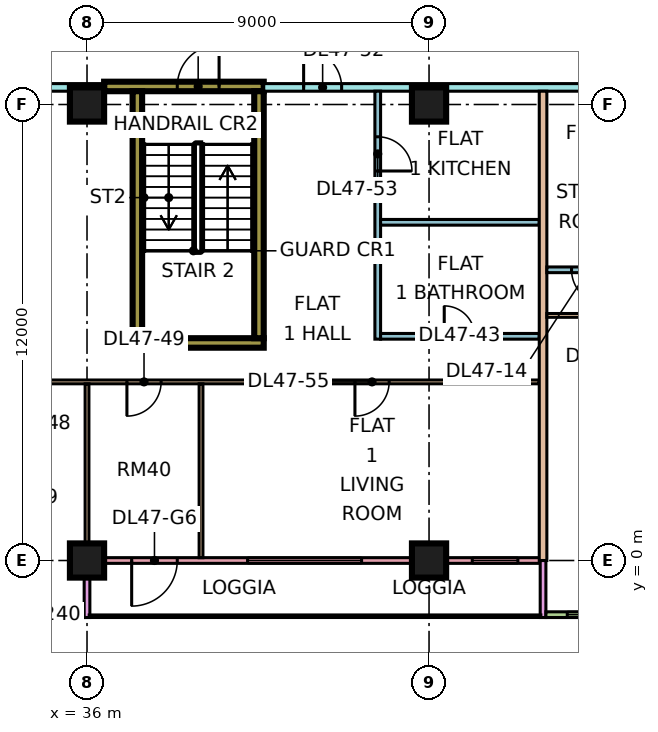
"""IFC4 building model, lengths in metres.
Left out: names, types, materials, properties, quantities, classifications, styles, units other than length and angle.
Written with IfcOpenShell. Run it as: python <this file> out.ifc"""

import sys

from ifc_helpers import new_model, si_unit, direction, frame, frame_2d, origin, origin_2d, place, context, subcontext, project, spatial, rectangle, extrude, element, fill, save


model = new_model("IFC4")
c1 = context("Model", 3, precision=1e-05, world=origin(), true_north=direction((0.0, 1.0)))
c2 = subcontext(c1, "Body", "Model", "MODEL_VIEW")
j1 = project(units=[si_unit("LENGTHUNIT", "METRE"), si_unit("PLANEANGLEUNIT", "RADIAN")], contexts=[c1])
p1 = place(None, origin())
s1 = spatial("IfcSite", under=j1, at=p1, CompositionType="ELEMENT")
p2 = place(p1, origin())
s2 = spatial("IfcBuilding", under=s1, at=p2, CompositionType="ELEMENT")
p3 = place(p2, frame((0.0, 0.0, 202.4)))
s3 = spatial("IfcBuildingStorey", under=s2, at=p3, CompositionType="ELEMENT", Elevation=202.4)
for number, where, z_axis, x_axis in (
    (1, (36.0, 0.0, 0.0), (0.0, 0.0, 1.0), (1.0, 0.0, 0.0)),
    (2, (36.0, 12.0, 0.0), (0.0, 0.0, 1.0), (1.0, 0.0, 0.0)),
    (3, (45.0, 0.0, 0.0), (0.0, 0.0, 1.0), (1.0, 0.0, 0.0)),
    (4, (45.0, 12.0, 0.0), (0.0, 0.0, 1.0), (1.0, 0.0, 0.0)),
):
    element("IfcColumn", number, at=place(p3, frame(where, z_axis=z_axis, x_axis=x_axis)), inside=s3, PredefinedType="COLUMN", context=c2, shape_type="SweptSolid", body=[
        extrude(rectangle(XDim=0.9, YDim=0.9, at=origin_2d()), origin(), (0.0, 0.0, 1.0), 3.75),
    ])
p4 = place(p3, frame((37.2, 5.725, 0.0), z_axis=(0.0, 0.0, 1.0), x_axis=(1.0, 0.0, 0.0)))
e5 = element("IfcWall", 5, at=p4, inside=s3, PredefinedType="SHEAR", context=c2, shape_type="SweptSolid", body=[
    extrude(rectangle(XDim=3.45, YDim=0.25, at=frame_2d((1.725, 0.0))), origin(), (0.0, 0.0, 1.0), 3.75),
])
p5 = place(p3, frame((36.45, 12.475, 0.0), z_axis=(0.0, 0.0, 1.0), x_axis=(1.0, 0.0, 0.0)))
e6 = element("IfcWall", 6, at=p5, inside=s3, PredefinedType="SHEAR", context=c2, shape_type="SweptSolid", body=[
    extrude(rectangle(XDim=4.2, YDim=0.25, at=frame_2d((2.1, 0.0))), origin(), (0.0, 0.0, 1.0), 3.75),
])
p6 = place(p5, frame((1.925, 0.0, 0.0)))
e7 = element("IfcOpeningElement", 7, at=p6, cuts=e6, PredefinedType="OPENING", context=c2, shape_type="SweptSolid", body=[
    extrude(rectangle(XDim=1.1, YDim=2.2, at=frame_2d((0.55, 1.1))), frame((0.0, 0.135, 0.0), z_axis=(0.0, -1.0, 0.0), x_axis=(1.0, 0.0, 0.0)), (0.0, 0.0, 1.0), 0.27),
])
for number, where, z_axis, x_axis in (
    (8, (37.325, 5.85, 0.0), (0.0, 0.0, 1.0), (0.0, 1.0, 0.0)),
    (9, (40.525, 5.85, 0.0), (0.0, 0.0, 1.0), (0.0, 1.0, 0.0)),
):
    element("IfcWall", number, at=place(p3, frame(where, z_axis=z_axis, x_axis=x_axis)), inside=s3, PredefinedType="SHEAR", context=c2, shape_type="SweptSolid", body=[
        extrude(rectangle(XDim=6.5, YDim=0.25, at=frame_2d((3.25, 0.0))), origin(), (0.0, 0.0, 1.0), 3.75),
    ])
p7 = place(p3, frame((24.075, -1.425, 0.0), z_axis=(0.0, 0.0, 1.0), x_axis=(1.0, 0.0, 0.0)))
e10 = element("IfcWall", 10, at=p7, inside=s3, PredefinedType="SOLIDWALL", context=c2, shape_type="SweptSolid", body=[
    extrude(rectangle(XDim=11.85, YDim=0.15, at=frame_2d((5.925, 0.0))), origin(), (0.0, 0.0, 1.0), 3.3),
])
p8 = place(p7, frame((0.562, 0.0, 0.45)))
e11 = element("IfcOpeningElement", 11, at=p8, cuts=e10, PredefinedType="OPENING", context=c2, shape_type="SweptSolid", body=[
    extrude(rectangle(XDim=1.8, YDim=2.4, at=frame_2d((0.9, 1.2))), frame((0.0, 0.085, 0.0), z_axis=(0.0, -1.0, 0.0), x_axis=(1.0, 0.0, 0.0)), (0.0, 0.0, 1.0), 0.17),
])
p9 = place(p7, frame((3.525, 0.0, 0.45)))
e12 = element("IfcOpeningElement", 12, at=p9, cuts=e10, PredefinedType="OPENING", context=c2, shape_type="SweptSolid", body=[
    extrude(rectangle(XDim=1.8, YDim=2.4, at=frame_2d((0.9, 1.2))), frame((0.0, 0.085, 0.0), z_axis=(0.0, -1.0, 0.0), x_axis=(1.0, 0.0, 0.0)), (0.0, 0.0, 1.0), 0.17),
])
p10 = place(p7, frame((6.525, 0.0, 0.45)))
e13 = element("IfcOpeningElement", 13, at=p10, cuts=e10, PredefinedType="OPENING", context=c2, shape_type="SweptSolid", body=[
    extrude(rectangle(XDim=1.8, YDim=2.4, at=frame_2d((0.9, 1.2))), frame((0.0, 0.085, 0.0), z_axis=(0.0, -1.0, 0.0), x_axis=(1.0, 0.0, 0.0)), (0.0, 0.0, 1.0), 0.17),
])
p11 = place(p7, frame((9.488, 0.0, 0.45)))
e14 = element("IfcOpeningElement", 14, at=p11, cuts=e10, PredefinedType="OPENING", context=c2, shape_type="SweptSolid", body=[
    extrude(rectangle(XDim=1.8, YDim=2.4, at=frame_2d((0.9, 1.2))), frame((0.0, 0.085, 0.0), z_axis=(0.0, -1.0, 0.0), x_axis=(1.0, 0.0, 0.0)), (0.0, 0.0, 1.0), 0.17),
])
p12 = place(p3, frame((36.075, 0.0, 0.0), z_axis=(0.0, 0.0, 1.0), x_axis=(1.0, 0.0, 0.0)))
e15 = element("IfcWall", 15, at=p12, inside=s3, PredefinedType="SOLIDWALL", context=c2, shape_type="SweptSolid", body=[
    extrude(rectangle(XDim=11.85, YDim=0.15, at=frame_2d((5.925, 0.0))), origin(), (0.0, 0.0, 1.0), 3.3),
])
p13 = place(p12, frame((1.1, 0.0, 0.0)))
e16 = element("IfcOpeningElement", 16, at=p13, cuts=e15, PredefinedType="OPENING", context=c2, shape_type="SweptSolid", body=[
    extrude(rectangle(XDim=1.2, YDim=2.4, at=frame_2d((0.6, 1.2))), frame((0.0, 0.085, 0.0), z_axis=(0.0, -1.0, 0.0), x_axis=(1.0, 0.0, 0.0)), (0.0, 0.0, 1.0), 0.17),
])
p14 = place(p12, frame((4.15, 0.0, 0.45)))
e17 = element("IfcOpeningElement", 17, at=p14, cuts=e15, PredefinedType="OPENING", context=c2, shape_type="SweptSolid", body=[
    extrude(rectangle(XDim=3.0, YDim=2.4, at=frame_2d((1.5, 1.2))), frame((0.0, 0.085, 0.0), z_axis=(0.0, -1.0, 0.0), x_axis=(1.0, 0.0, 0.0)), (0.0, 0.0, 1.0), 0.17),
])
p15 = place(p12, frame((10.062, 0.0, 0.45)))
e18 = element("IfcOpeningElement", 18, at=p15, cuts=e15, PredefinedType="OPENING", context=c2, shape_type="SweptSolid", body=[
    extrude(rectangle(XDim=1.2, YDim=2.4, at=frame_2d((0.6, 1.2))), frame((0.0, 0.085, 0.0), z_axis=(0.0, -1.0, 0.0), x_axis=(1.0, 0.0, 0.0)), (0.0, 0.0, 1.0), 0.17),
])
for number, where, z_axis, x_axis in (
    (19, (36.0, -1.5, 0.0), (0.0, 0.0, 1.0), (0.0, 1.0, 0.0)),
    (20, (48.0, -1.5, 0.0), (0.0, 0.0, 1.0), (0.0, 1.0, 0.0)),
):
    element("IfcWall", number, at=place(p3, frame(where, z_axis=z_axis, x_axis=x_axis)), inside=s3, PredefinedType="SOLIDWALL", context=c2, shape_type="SweptSolid", body=[
        extrude(rectangle(XDim=1.5, YDim=0.15, at=frame_2d((0.75, 0.0))), origin(), (0.0, 0.0, 1.0), 3.3),
    ])
p16 = place(p3, frame((48.075, -1.425, 0.0), z_axis=(0.0, 0.0, 1.0), x_axis=(1.0, 0.0, 0.0)))
e21 = element("IfcWall", 21, at=p16, inside=s3, PredefinedType="SOLIDWALL", context=c2, shape_type="SweptSolid", body=[
    extrude(rectangle(XDim=13.425, YDim=0.15, at=frame_2d((6.712, 0.0))), origin(), (0.0, 0.0, 1.0), 3.3),
])
p17 = place(p16, frame((0.562, 0.0, 0.45)))
e22 = element("IfcOpeningElement", 22, at=p17, cuts=e21, PredefinedType="OPENING", context=c2, shape_type="SweptSolid", body=[
    extrude(rectangle(XDim=1.8, YDim=2.4, at=frame_2d((0.9, 1.2))), frame((0.0, 0.085, 0.0), z_axis=(0.0, -1.0, 0.0), x_axis=(1.0, 0.0, 0.0)), (0.0, 0.0, 1.0), 0.17),
])
p18 = place(p16, frame((3.525, 0.0, 0.45)))
e23 = element("IfcOpeningElement", 23, at=p18, cuts=e21, PredefinedType="OPENING", context=c2, shape_type="SweptSolid", body=[
    extrude(rectangle(XDim=1.8, YDim=2.4, at=frame_2d((0.9, 1.2))), frame((0.0, 0.085, 0.0), z_axis=(0.0, -1.0, 0.0), x_axis=(1.0, 0.0, 0.0)), (0.0, 0.0, 1.0), 0.17),
])
p19 = place(p16, frame((6.525, 0.0, 0.45)))
e24 = element("IfcOpeningElement", 24, at=p19, cuts=e21, PredefinedType="OPENING", context=c2, shape_type="SweptSolid", body=[
    extrude(rectangle(XDim=1.8, YDim=2.4, at=frame_2d((0.9, 1.2))), frame((0.0, 0.085, 0.0), z_axis=(0.0, -1.0, 0.0), x_axis=(1.0, 0.0, 0.0)), (0.0, 0.0, 1.0), 0.17),
])
p20 = place(p16, frame((9.675, 0.0, 0.45)))
e25 = element("IfcOpeningElement", 25, at=p20, cuts=e21, PredefinedType="OPENING", context=c2, shape_type="SweptSolid", body=[
    extrude(rectangle(XDim=3.0, YDim=2.4, at=frame_2d((1.5, 1.2))), frame((0.0, 0.085, 0.0), z_axis=(0.0, -1.0, 0.0), x_axis=(1.0, 0.0, 0.0)), (0.0, 0.0, 1.0), 0.17),
])
p21 = place(p3, frame((33.05, 4.7, 0.0), z_axis=(0.0, 0.0, 1.0), x_axis=(1.0, 0.0, 0.0)))
e26 = element("IfcWall", 26, at=p21, inside=s3, PredefinedType="PARTITIONING", context=c2, shape_type="SweptSolid", body=[
    extrude(rectangle(XDim=14.85, YDim=0.1, at=frame_2d((7.425, 0.0))), origin(), (0.0, 0.0, 1.0), 3.3),
])
p22 = place(p21, frame((1.0, 0.0, 0.0)))
e27 = element("IfcOpeningElement", 27, at=p22, cuts=e26, PredefinedType="OPENING", context=c2, shape_type="SweptSolid", body=[
    extrude(rectangle(XDim=0.9, YDim=2.1, at=frame_2d((0.45, 1.05))), frame((0.0, 0.06, 0.0), z_axis=(0.0, -1.0, 0.0), x_axis=(1.0, 0.0, 0.0)), (0.0, 0.0, 1.0), 0.12),
])
p23 = place(p21, frame((4.0, 0.0, 0.0)))
e28 = element("IfcOpeningElement", 28, at=p23, cuts=e26, PredefinedType="OPENING", context=c2, shape_type="SweptSolid", body=[
    extrude(rectangle(XDim=0.9, YDim=2.1, at=frame_2d((0.45, 1.05))), frame((0.0, 0.06, 0.0), z_axis=(0.0, -1.0, 0.0), x_axis=(1.0, 0.0, 0.0)), (0.0, 0.0, 1.0), 0.12),
])
p24 = place(p21, frame((10.0, 0.0, 0.0)))
e29 = element("IfcOpeningElement", 29, at=p24, cuts=e26, PredefinedType="OPENING", context=c2, shape_type="SweptSolid", body=[
    extrude(rectangle(XDim=0.9, YDim=2.1, at=frame_2d((0.45, 1.05))), frame((0.0, 0.06, 0.0), z_axis=(0.0, -1.0, 0.0), x_axis=(1.0, 0.0, 0.0)), (0.0, 0.0, 1.0), 0.12),
])
p25 = place(p3, frame((34.0, 12.45, 0.0), z_axis=(0.0, 0.0, 1.0), x_axis=(1.0, 0.0, 0.0)))
e30 = element("IfcWall", 30, at=p25, inside=s3, PredefinedType="PARTITIONING", context=c2, shape_type="SweptSolid", body=[
    extrude(rectangle(XDim=2.451, YDim=0.2, at=frame_2d((1.226, 0.0))), origin(), (0.0, 0.0, 1.0), 3.3),
])
p26 = place(p3, frame((36.0, 0.0, 0.0), z_axis=(0.0, 0.0, 1.0), x_axis=(0.0, 1.0, 0.0)))
e31 = element("IfcWall", 31, at=p26, inside=s3, PredefinedType="PARTITIONING", context=c2, shape_type="SweptSolid", body=[
    extrude(rectangle(XDim=4.65, YDim=0.1, at=frame_2d((2.325, 0.0))), origin(), (0.0, 0.0, 1.0), 3.3),
])
p27 = place(p3, frame((39.0, 0.074, 0.0), z_axis=(0.0, 0.0, 1.0), x_axis=(0.0, 1.0, 0.0)))
e32 = element("IfcWall", 32, at=p27, inside=s3, PredefinedType="PARTITIONING", context=c2, shape_type="SweptSolid", body=[
    extrude(rectangle(XDim=4.576, YDim=0.1, at=frame_2d((2.288, 0.0))), origin(), (0.0, 0.0, 1.0), 3.3),
])
p28 = place(p3, frame((40.65, 12.45, 0.0), z_axis=(0.0, 0.0, 1.0), x_axis=(1.0, 0.0, 0.0)))
e33 = element("IfcWall", 33, at=p28, inside=s3, PredefinedType="PARTITIONING", context=c2, shape_type="SweptSolid", body=[
    extrude(rectangle(XDim=22.276, YDim=0.2, at=frame_2d((11.138, 0.0))), origin(), (0.0, 0.0, 1.0), 3.3),
])
p29 = place(p28, frame((20.55, 0.0, 0.0)))
e34 = element("IfcOpeningElement", 34, at=p29, cuts=e33, PredefinedType="OPENING", context=c2, shape_type="SweptSolid", body=[
    extrude(rectangle(XDim=1.0, YDim=2.1, at=frame_2d((0.5, 1.05))), frame((0.0, 0.11, 0.0), z_axis=(0.0, -1.0, 0.0), x_axis=(1.0, 0.0, 0.0)), (0.0, 0.0, 1.0), 0.22),
])
p30 = place(p28, frame((1.05, 0.0, 0.0)))
e35 = element("IfcOpeningElement", 35, at=p30, cuts=e33, PredefinedType="OPENING", context=c2, shape_type="SweptSolid", body=[
    extrude(rectangle(XDim=1.0, YDim=2.1, at=frame_2d((0.5, 1.05))), frame((0.0, 0.11, 0.0), z_axis=(0.0, -1.0, 0.0), x_axis=(1.0, 0.0, 0.0)), (0.0, 0.0, 1.0), 0.22),
])
p31 = place(p3, frame((43.65, 5.825, 0.0), z_axis=(0.0, 0.0, 1.0), x_axis=(0.0, 1.0, 0.0)))
e36 = element("IfcWall", 36, at=p31, inside=s3, PredefinedType="PARTITIONING", context=c2, shape_type="SweptSolid", body=[
    extrude(rectangle(XDim=6.525, YDim=0.15, at=frame_2d((3.263, 0.0))), origin(), (0.0, 0.0, 1.0), 3.3),
])
p32 = place(p31, frame((4.425, 0.0, 0.0)))
e37 = element("IfcOpeningElement", 37, at=p32, cuts=e36, PredefinedType="OPENING", context=c2, shape_type="SweptSolid", body=[
    extrude(rectangle(XDim=0.9, YDim=2.1, at=frame_2d((0.45, 1.05))), frame((0.0, 0.085, 0.0), z_axis=(0.0, -1.0, 0.0), x_axis=(1.0, 0.0, 0.0)), (0.0, 0.0, 1.0), 0.17),
])
p33 = place(p3, frame((43.725, 5.9, 0.0), z_axis=(0.0, 0.0, 1.0), x_axis=(1.0, 0.0, 0.0)))
e38 = element("IfcWall", 38, at=p33, inside=s3, PredefinedType="PARTITIONING", context=c2, shape_type="SweptSolid", body=[
    extrude(rectangle(XDim=4.175, YDim=0.15, at=frame_2d((2.087, 0.0))), origin(), (0.0, 0.0, 1.0), 3.3),
])
p34 = place(p33, frame((1.675, 0.0, 0.0)))
e39 = element("IfcOpeningElement", 39, at=p34, cuts=e38, PredefinedType="OPENING", context=c2, shape_type="SweptSolid", body=[
    extrude(rectangle(XDim=0.8, YDim=2.1, at=frame_2d((0.4, 1.05))), frame((0.0, 0.085, 0.0), z_axis=(0.0, -1.0, 0.0), x_axis=(1.0, 0.0, 0.0)), (0.0, 0.0, 1.0), 0.17),
])
p35 = place(p3, frame((43.725, 8.9, 0.0), z_axis=(0.0, 0.0, 1.0), x_axis=(1.0, 0.0, 0.0)))
e40 = element("IfcWall", 40, at=p35, inside=s3, PredefinedType="PARTITIONING", context=c2, shape_type="SweptSolid", body=[
    extrude(rectangle(XDim=4.175, YDim=0.15, at=frame_2d((2.087, 0.0))), origin(), (0.0, 0.0, 1.0), 3.3),
])
p36 = place(p3, frame((48.0, 0.0, 0.0), z_axis=(0.0, 0.0, 1.0), x_axis=(0.0, 1.0, 0.0)))
e41 = element("IfcWall", 41, at=p36, inside=s3, PredefinedType="PARTITIONING", context=c2, shape_type="SweptSolid", body=[
    extrude(rectangle(XDim=12.35, YDim=0.2, at=frame_2d((6.175, 0.0))), origin(), (0.0, 0.0, 1.0), 3.3),
])
p37 = place(p3, frame((48.1, 6.45, 0.0), z_axis=(0.0, 0.0, 1.0), x_axis=(1.0, 0.0, 0.0)))
e42 = element("IfcWall", 42, at=p37, inside=s3, PredefinedType="PARTITIONING", context=c2, shape_type="SweptSolid", body=[
    extrude(rectangle(XDim=8.95, YDim=0.1, at=frame_2d((4.475, 0.0))), origin(), (0.0, 0.0, 1.0), 3.3),
])
p38 = place(p37, frame((0.95, 0.0, 0.0)))
e43 = element("IfcOpeningElement", 43, at=p38, cuts=e42, PredefinedType="OPENING", context=c2, shape_type="SweptSolid", body=[
    extrude(rectangle(XDim=0.9, YDim=2.1, at=frame_2d((0.45, 1.05))), frame((0.0, 0.06, 0.0), z_axis=(0.0, -1.0, 0.0), x_axis=(1.0, 0.0, 0.0)), (0.0, 0.0, 1.0), 0.12),
])
p39 = place(p37, frame((3.95, 0.0, 0.0)))
e44 = element("IfcOpeningElement", 44, at=p39, cuts=e42, PredefinedType="OPENING", context=c2, shape_type="SweptSolid", body=[
    extrude(rectangle(XDim=0.9, YDim=2.1, at=frame_2d((0.45, 1.05))), frame((0.0, 0.06, 0.0), z_axis=(0.0, -1.0, 0.0), x_axis=(1.0, 0.0, 0.0)), (0.0, 0.0, 1.0), 0.12),
])
p40 = place(p37, frame((6.95, 0.0, 0.0)))
e45 = element("IfcOpeningElement", 45, at=p40, cuts=e42, PredefinedType="OPENING", context=c2, shape_type="SweptSolid", body=[
    extrude(rectangle(XDim=0.9, YDim=2.1, at=frame_2d((0.45, 1.05))), frame((0.0, 0.06, 0.0), z_axis=(0.0, -1.0, 0.0), x_axis=(1.0, 0.0, 0.0)), (0.0, 0.0, 1.0), 0.12),
])
p41 = place(p3, frame((48.1, 7.65, 0.0), z_axis=(0.0, 0.0, 1.0), x_axis=(1.0, 0.0, 0.0)))
e46 = element("IfcWall", 46, at=p41, inside=s3, PredefinedType="PARTITIONING", context=c2, shape_type="SweptSolid", body=[
    extrude(rectangle(XDim=12.25, YDim=0.15, at=frame_2d((6.125, 0.0))), origin(), (0.0, 0.0, 1.0), 3.3),
])
p42 = place(p41, frame((3.75, 0.0, 0.0)))
e47 = element("IfcOpeningElement", 47, at=p42, cuts=e46, PredefinedType="OPENING", context=c2, shape_type="SweptSolid", body=[
    extrude(rectangle(XDim=0.8, YDim=2.1, at=frame_2d((0.4, 1.05))), frame((0.0, 0.085, 0.0), z_axis=(0.0, -1.0, 0.0), x_axis=(1.0, 0.0, 0.0)), (0.0, 0.0, 1.0), 0.17),
])
p43 = place(p41, frame((0.65, 0.0, 0.0)))
e48 = element("IfcOpeningElement", 48, at=p43, cuts=e46, PredefinedType="OPENING", context=c2, shape_type="SweptSolid", body=[
    extrude(rectangle(XDim=0.9, YDim=2.1, at=frame_2d((0.45, 1.05))), frame((0.0, 0.085, 0.0), z_axis=(0.0, -1.0, 0.0), x_axis=(1.0, 0.0, 0.0)), (0.0, 0.0, 1.0), 0.17),
])
p44 = place(p11, origin())
e49 = element("IfcWindow", 49, at=p44, inside=s3, PartitioningType="SINGLE_PANEL", PredefinedType="WINDOW", context=c2, shape_type="SweptSolid", body=[
    extrude(rectangle(XDim=1.8, YDim=2.4, at=frame_2d((0.9, 1.2))), frame((0.0, 0.03, 0.0), z_axis=(0.0, -1.0, 0.0), x_axis=(1.0, 0.0, 0.0)), (0.0, 0.0, 1.0), 0.06),
])
fill(e14, e49)
p45 = place(p13, frame((1.2, 0.0, 0.0), z_axis=(0.0, 0.0, 1.0), x_axis=(-1.0, 0.0, 0.0)))
e50 = element("IfcDoor", 50, at=p45, inside=s3, OperationType="DOUBLE_DOOR_SINGLE_SWING", PredefinedType="DOOR", context=c2, shape_type="SweptSolid", body=[
    extrude(rectangle(XDim=1.2, YDim=2.4, at=frame_2d((0.6, 1.2))), frame((0.0, 0.025, 0.0), z_axis=(0.0, -1.0, 0.0), x_axis=(1.0, 0.0, 0.0)), (0.0, 0.0, 1.0), 0.05),
])
fill(e16, e50)
p46 = place(p14, origin())
e51 = element("IfcWindow", 51, at=p46, inside=s3, PartitioningType="SINGLE_PANEL", PredefinedType="WINDOW", context=c2, shape_type="SweptSolid", body=[
    extrude(rectangle(XDim=3.0, YDim=2.4, at=frame_2d((1.5, 1.2))), frame((0.0, 0.03, 0.0), z_axis=(0.0, -1.0, 0.0), x_axis=(1.0, 0.0, 0.0)), (0.0, 0.0, 1.0), 0.06),
])
fill(e17, e51)
p47 = place(p15, origin())
e52 = element("IfcWindow", 52, at=p47, inside=s3, PartitioningType="SINGLE_PANEL", PredefinedType="WINDOW", context=c2, shape_type="SweptSolid", body=[
    extrude(rectangle(XDim=1.2, YDim=2.4, at=frame_2d((0.6, 1.2))), frame((0.0, 0.03, 0.0), z_axis=(0.0, -1.0, 0.0), x_axis=(1.0, 0.0, 0.0)), (0.0, 0.0, 1.0), 0.06),
])
fill(e18, e52)
p48 = place(p17, origin())
e53 = element("IfcWindow", 53, at=p48, inside=s3, PartitioningType="SINGLE_PANEL", PredefinedType="WINDOW", context=c2, shape_type="SweptSolid", body=[
    extrude(rectangle(XDim=1.8, YDim=2.4, at=frame_2d((0.9, 1.2))), frame((0.0, 0.03, 0.0), z_axis=(0.0, -1.0, 0.0), x_axis=(1.0, 0.0, 0.0)), (0.0, 0.0, 1.0), 0.06),
])
fill(e22, e53)
p49 = place(p6, frame((1.1, 0.0, 0.0), z_axis=(0.0, 0.0, 1.0), x_axis=(-1.0, 0.0, 0.0)))
e54 = element("IfcDoor", 54, at=p49, inside=s3, OperationType="SINGLE_SWING_RIGHT", PredefinedType="DOOR", context=c2, shape_type="SweptSolid", body=[
    extrude(rectangle(XDim=1.1, YDim=2.2, at=frame_2d((0.55, 1.1))), frame((0.0, 0.025, 0.0), z_axis=(0.0, -1.0, 0.0), x_axis=(1.0, 0.0, 0.0)), (0.0, 0.0, 1.0), 0.05),
])
fill(e7, e54)
p50 = place(p43, origin())
e55 = element("IfcDoor", 55, at=p50, inside=s3, OperationType="SINGLE_SWING_RIGHT", PredefinedType="DOOR", context=c2, shape_type="SweptSolid", body=[
    extrude(rectangle(XDim=0.9, YDim=2.1, at=frame_2d((0.45, 1.05))), frame((0.0, 0.025, 0.0), z_axis=(0.0, -1.0, 0.0), x_axis=(1.0, 0.0, 0.0)), (0.0, 0.0, 1.0), 0.05),
])
fill(e48, e55)
p51 = place(p34, origin())
e56 = element("IfcDoor", 56, at=p51, inside=s3, OperationType="SINGLE_SWING_LEFT", PredefinedType="DOOR", context=c2, shape_type="SweptSolid", body=[
    extrude(rectangle(XDim=0.8, YDim=2.1, at=frame_2d((0.4, 1.05))), frame((0.0, 0.025, 0.0), z_axis=(0.0, -1.0, 0.0), x_axis=(1.0, 0.0, 0.0)), (0.0, 0.0, 1.0), 0.05),
])
fill(e39, e56)
p52 = place(p23, frame((0.9, 0.0, 0.0), z_axis=(0.0, 0.0, 1.0), x_axis=(-1.0, 0.0, 0.0)))
e57 = element("IfcDoor", 57, at=p52, inside=s3, OperationType="SINGLE_SWING_LEFT", PredefinedType="DOOR", context=c2, shape_type="SweptSolid", body=[
    extrude(rectangle(XDim=0.9, YDim=2.1, at=frame_2d((0.45, 1.05))), frame((0.0, 0.025, 0.0), z_axis=(0.0, -1.0, 0.0), x_axis=(1.0, 0.0, 0.0)), (0.0, 0.0, 1.0), 0.05),
])
fill(e28, e57)
p53 = place(p30, origin())
e58 = element("IfcDoor", 58, at=p53, inside=s3, OperationType="SINGLE_SWING_LEFT", PredefinedType="DOOR", context=c2, shape_type="SweptSolid", body=[
    extrude(rectangle(XDim=1.0, YDim=2.1, at=frame_2d((0.5, 1.05))), frame((0.0, 0.025, 0.0), z_axis=(0.0, -1.0, 0.0), x_axis=(1.0, 0.0, 0.0)), (0.0, 0.0, 1.0), 0.05),
])
fill(e35, e58)
p54 = place(p32, frame((0.9, 0.0, 0.0), z_axis=(0.0, 0.0, 1.0), x_axis=(-1.0, 0.0, 0.0)))
e59 = element("IfcDoor", 59, at=p54, inside=s3, OperationType="SINGLE_SWING_LEFT", PredefinedType="DOOR", context=c2, shape_type="SweptSolid", body=[
    extrude(rectangle(XDim=0.9, YDim=2.1, at=frame_2d((0.45, 1.05))), frame((0.0, 0.025, 0.0), z_axis=(0.0, -1.0, 0.0), x_axis=(1.0, 0.0, 0.0)), (0.0, 0.0, 1.0), 0.05),
])
fill(e37, e59)
p55 = place(p24, frame((0.9, 0.0, 0.0), z_axis=(0.0, 0.0, 1.0), x_axis=(-1.0, 0.0, 0.0)))
e60 = element("IfcDoor", 60, at=p55, inside=s3, OperationType="SINGLE_SWING_LEFT", PredefinedType="DOOR", context=c2, shape_type="SweptSolid", body=[
    extrude(rectangle(XDim=0.9, YDim=2.1, at=frame_2d((0.45, 1.05))), frame((0.0, 0.025, 0.0), z_axis=(0.0, -1.0, 0.0), x_axis=(1.0, 0.0, 0.0)), (0.0, 0.0, 1.0), 0.05),
])
fill(e29, e60)
save(model, sys.argv[1])
